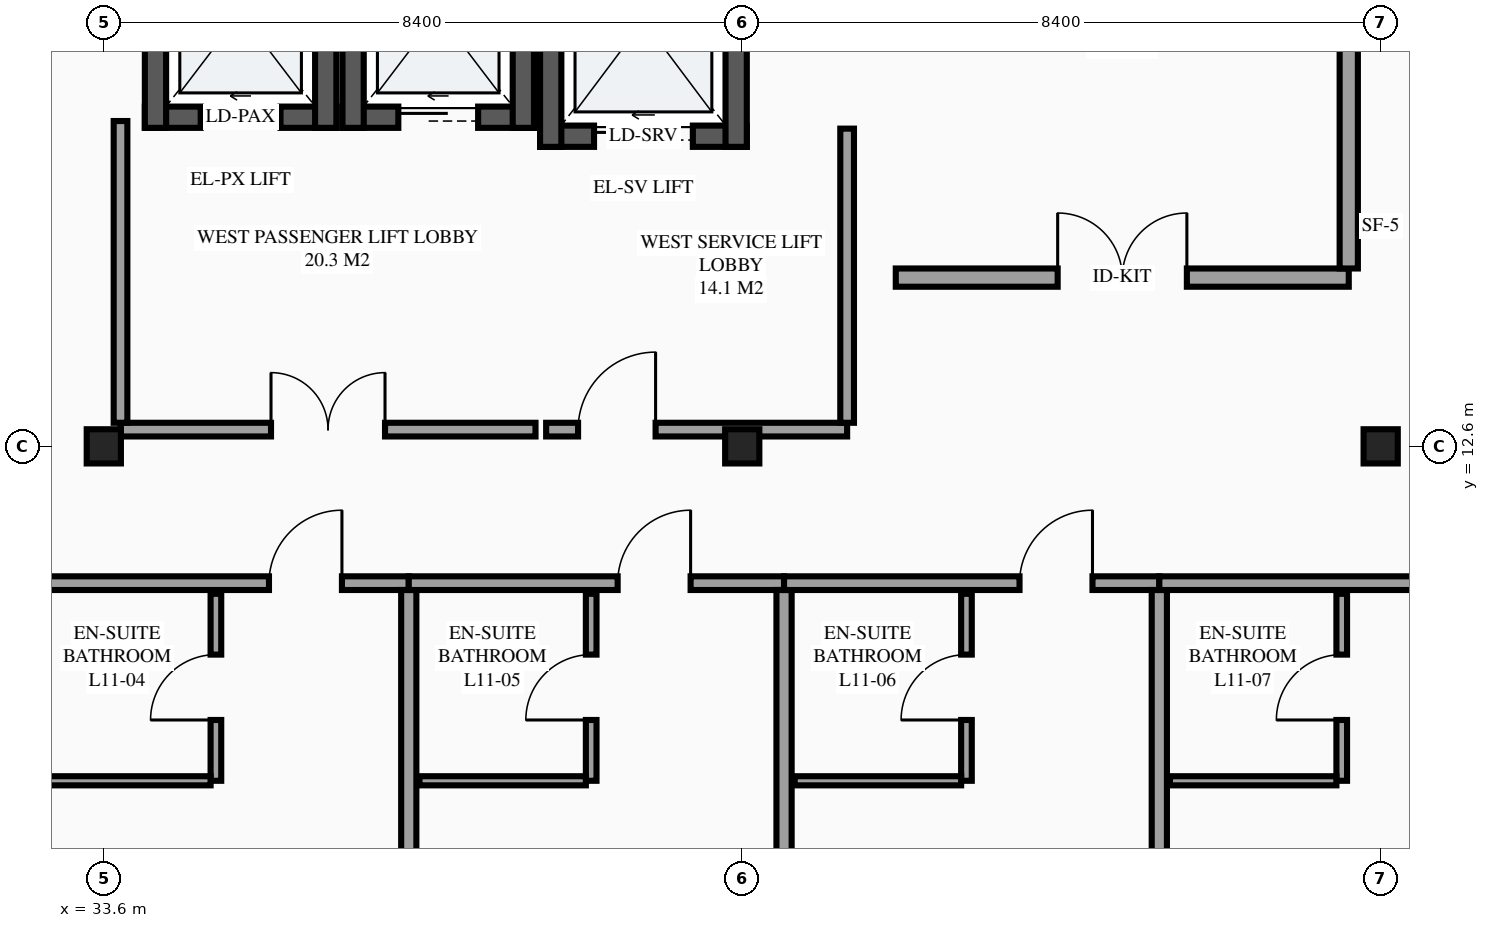
"""IFC4 building model, lengths in metres.
Left out: names, types, materials, properties, quantities, classifications, styles, units other than length and angle.
Written with IfcOpenShell. Run it as: python <this file> out.ifc"""

import sys

from ifc_helpers import new_model, si_unit, direction, frame, frame_2d, origin, origin_2d, place, context, subcontext, project, spatial, rectangle, extrude, element, fill, save


model = new_model("IFC4")
c1 = context("Model", 3, precision=1e-05, world=origin(), true_north=direction((0.0, 1.0)))
c2 = subcontext(c1, "Body", "Model", "MODEL_VIEW")
j1 = project(units=[si_unit("LENGTHUNIT", "METRE"), si_unit("PLANEANGLEUNIT", "RADIAN")], contexts=[c1])
p1 = place(None, origin())
s1 = spatial("IfcSite", under=j1, at=p1, CompositionType="ELEMENT")
p2 = place(p1, origin())
s2 = spatial("IfcBuilding", under=s1, at=p2, CompositionType="ELEMENT")
p3 = place(p2, frame((0.0, 0.0, 43.5)))
s3 = spatial("IfcBuildingStorey", under=s2, at=p3, CompositionType="ELEMENT", Elevation=43.5)
for number, where, z_axis, x_axis in (
    (1, (33.6, 12.6, 0.0), (0.0, 0.0, 1.0), (1.0, 0.0, 0.0)),
    (2, (42.0, 12.6, 0.0), (0.0, 0.0, 1.0), (1.0, 0.0, 0.0)),
    (3, (50.4, 12.6, 0.0), (0.0, 0.0, 1.0), (1.0, 0.0, 0.0)),
):
    element("IfcColumn", number, at=place(p3, frame(where, z_axis=z_axis, x_axis=x_axis)), inside=s3, PredefinedType="COLUMN", context=c2, shape_type="SweptSolid", body=[
        extrude(rectangle(XDim=0.45, YDim=0.45, at=origin_2d()), origin(), (0.0, 0.0, 1.0), 3.6),
    ])
p4 = place(p3, frame((34.14, 16.93, 0.0), z_axis=(0.0, 0.0, 1.0), x_axis=(1.0, 0.0, 0.0)))
e4 = element("IfcWall", 4, at=p4, inside=s3, PredefinedType="SHEAR", context=c2, shape_type="SweptSolid", body=[
    extrude(rectangle(XDim=2.52, YDim=0.28, at=frame_2d((1.26, 0.0))), origin(), (0.0, 0.0, 1.0), 3.6),
])
p5 = place(p4, frame((0.735, 0.0, 0.0)))
e5 = element("IfcOpeningElement", 5, at=p5, cuts=e4, PredefinedType="OPENING", context=c2, shape_type="SweptSolid", body=[
    extrude(rectangle(XDim=1.05, YDim=2.2, at=frame_2d((0.525, 1.1))), frame((0.0, 0.15, 0.0), z_axis=(0.0, -1.0, 0.0), x_axis=(1.0, 0.0, 0.0)), (0.0, 0.0, 1.0), 0.3),
])
for number, where, z_axis, x_axis in (
    (6, (36.52, 16.79, 0.0), (0.0, 0.0, 1.0), (0.0, 1.0, 0.0)),
    (7, (34.28, 19.81, 0.0), (0.0, 0.0, 1.0), (0.0, -1.0, 0.0)),
):
    element("IfcWall", number, at=place(p3, frame(where, z_axis=z_axis, x_axis=x_axis)), inside=s3, PredefinedType="SHEAR", context=c2, shape_type="SweptSolid", body=[
        extrude(rectangle(XDim=3.02, YDim=0.28, at=frame_2d((1.51, 0.0))), origin(), (0.0, 0.0, 1.0), 3.6),
    ])
p6 = place(p3, frame((36.74, 16.93, 0.0), z_axis=(0.0, 0.0, 1.0), x_axis=(1.0, 0.0, 0.0)))
e8 = element("IfcWall", 8, at=p6, inside=s3, PredefinedType="SHEAR", context=c2, shape_type="SweptSolid", body=[
    extrude(rectangle(XDim=2.52, YDim=0.28, at=frame_2d((1.26, 0.0))), origin(), (0.0, 0.0, 1.0), 3.6),
])
p7 = place(p6, frame((0.735, 0.0, 0.0)))
e9 = element("IfcOpeningElement", 9, at=p7, cuts=e8, PredefinedType="OPENING", context=c2, shape_type="SweptSolid", body=[
    extrude(rectangle(XDim=1.05, YDim=2.2, at=frame_2d((0.525, 1.1))), frame((0.0, 0.15, 0.0), z_axis=(0.0, -1.0, 0.0), x_axis=(1.0, 0.0, 0.0)), (0.0, 0.0, 1.0), 0.3),
])
for number, where, z_axis, x_axis in (
    (10, (39.12, 16.79, 0.0), (0.0, 0.0, 1.0), (0.0, 1.0, 0.0)),
    (11, (36.88, 19.81, 0.0), (0.0, 0.0, 1.0), (0.0, -1.0, 0.0)),
):
    element("IfcWall", number, at=place(p3, frame(where, z_axis=z_axis, x_axis=x_axis)), inside=s3, PredefinedType="SHEAR", context=c2, shape_type="SweptSolid", body=[
        extrude(rectangle(XDim=3.02, YDim=0.28, at=frame_2d((1.51, 0.0))), origin(), (0.0, 0.0, 1.0), 3.6),
    ])
p8 = place(p3, frame((39.34, 16.68, 0.0), z_axis=(0.0, 0.0, 1.0), x_axis=(1.0, 0.0, 0.0)))
e12 = element("IfcWall", 12, at=p8, inside=s3, PredefinedType="SHEAR", context=c2, shape_type="SweptSolid", body=[
    extrude(rectangle(XDim=2.72, YDim=0.28, at=frame_2d((1.36, 0.0))), origin(), (0.0, 0.0, 1.0), 3.6),
])
p9 = place(p8, frame((0.71, 0.0, 0.0)))
e13 = element("IfcOpeningElement", 13, at=p9, cuts=e12, PredefinedType="OPENING", context=c2, shape_type="SweptSolid", body=[
    extrude(rectangle(XDim=1.3, YDim=2.25, at=frame_2d((0.65, 1.125))), frame((0.0, 0.15, 0.0), z_axis=(0.0, -1.0, 0.0), x_axis=(1.0, 0.0, 0.0)), (0.0, 0.0, 1.0), 0.3),
])
for number, where, z_axis, x_axis in (
    (14, (41.92, 16.54, 0.0), (0.0, 0.0, 1.0), (0.0, 1.0, 0.0)),
    (15, (39.48, 19.86, 0.0), (0.0, 0.0, 1.0), (0.0, -1.0, 0.0)),
):
    element("IfcWall", number, at=place(p3, frame(where, z_axis=z_axis, x_axis=x_axis)), inside=s3, PredefinedType="SHEAR", context=c2, shape_type="SweptSolid", body=[
        extrude(rectangle(XDim=3.32, YDim=0.28, at=frame_2d((1.66, 0.0))), origin(), (0.0, 0.0, 1.0), 3.6),
    ])
p10 = place(p3, frame((32.675, 10.8, 0.0), z_axis=(0.0, 0.0, 1.0), x_axis=(1.0, 0.0, 0.0)))
e16 = element("IfcWall", 16, at=p10, inside=s3, PredefinedType="PARTITIONING", context=c2, shape_type="SweptSolid", body=[
    extrude(rectangle(XDim=4.938, YDim=0.18, at=frame_2d((2.469, 0.0))), origin(), (0.0, 0.0, 1.0), 3.355),
])
p11 = place(p10, frame((3.098, 0.0, 0.0)))
e17 = element("IfcOpeningElement", 17, at=p11, cuts=e16, PredefinedType="OPENING", context=c2, shape_type="SweptSolid", body=[
    extrude(rectangle(XDim=0.96, YDim=2.15, at=frame_2d((0.48, 1.075))), frame((0.0, 0.1, 0.0), z_axis=(0.0, -1.0, 0.0), x_axis=(1.0, 0.0, 0.0)), (0.0, 0.0, 1.0), 0.2),
])
p12 = place(p3, frame((37.613, 4.36, 0.0), z_axis=(0.0, 0.0, 1.0), x_axis=(0.0, 1.0, 0.0)))
e18 = element("IfcWall", 18, at=p12, inside=s3, PredefinedType="PARTITIONING", context=c2, shape_type="SweptSolid", body=[
    extrude(rectangle(XDim=6.35, YDim=0.2, at=frame_2d((3.175, 0.0))), origin(), (0.0, 0.0, 1.0), 3.355),
])
p13 = place(p3, frame((35.075, 8.2, 0.0), z_axis=(0.0, 0.0, 1.0), x_axis=(0.0, 1.0, 0.0)))
e19 = element("IfcWall", 19, at=p13, inside=s3, PredefinedType="PARTITIONING", context=c2, shape_type="SweptSolid", body=[
    extrude(rectangle(XDim=2.46, YDim=0.14, at=frame_2d((1.23, 0.0))), origin(), (0.0, 0.0, 1.0), 3.355),
])
p14 = place(p13, frame((0.8, 0.0, 0.0)))
e20 = element("IfcOpeningElement", 20, at=p14, cuts=e19, PredefinedType="OPENING", context=c2, shape_type="SweptSolid", body=[
    extrude(rectangle(XDim=0.86, YDim=2.1, at=frame_2d((0.43, 1.05))), frame((0.0, 0.08, 0.0), z_axis=(0.0, -1.0, 0.0), x_axis=(1.0, 0.0, 0.0)), (0.0, 0.0, 1.0), 0.16),
])
p15 = place(p3, frame((32.815, 8.2, 0.0), z_axis=(0.0, 0.0, 1.0), x_axis=(1.0, 0.0, 0.0)))
e21 = element("IfcWall", 21, at=p15, inside=s3, PredefinedType="PARTITIONING", context=c2, shape_type="SweptSolid", body=[
    extrude(rectangle(XDim=2.19, YDim=0.12, at=frame_2d((1.095, 0.0))), origin(), (0.0, 0.0, 1.0), 3.355),
])
p16 = place(p3, frame((37.613, 10.8, 0.0), z_axis=(0.0, 0.0, 1.0), x_axis=(1.0, 0.0, 0.0)))
e22 = element("IfcWall", 22, at=p16, inside=s3, PredefinedType="PARTITIONING", context=c2, shape_type="SweptSolid", body=[
    extrude(rectangle(XDim=4.938, YDim=0.18, at=frame_2d((2.469, 0.0))), origin(), (0.0, 0.0, 1.0), 3.355),
])
p17 = place(p16, frame((2.748, 0.0, 0.0)))
e23 = element("IfcOpeningElement", 23, at=p17, cuts=e22, PredefinedType="OPENING", context=c2, shape_type="SweptSolid", body=[
    extrude(rectangle(XDim=0.96, YDim=2.15, at=frame_2d((0.48, 1.075))), frame((0.0, 0.1, 0.0), z_axis=(0.0, -1.0, 0.0), x_axis=(1.0, 0.0, 0.0)), (0.0, 0.0, 1.0), 0.2),
])
p18 = place(p3, frame((42.55, 4.36, 0.0), z_axis=(0.0, 0.0, 1.0), x_axis=(0.0, 1.0, 0.0)))
e24 = element("IfcWall", 24, at=p18, inside=s3, PredefinedType="PARTITIONING", context=c2, shape_type="SweptSolid", body=[
    extrude(rectangle(XDim=6.35, YDim=0.2, at=frame_2d((3.175, 0.0))), origin(), (0.0, 0.0, 1.0), 3.355),
])
p19 = place(p3, frame((40.012, 8.2, 0.0), z_axis=(0.0, 0.0, 1.0), x_axis=(0.0, 1.0, 0.0)))
e25 = element("IfcWall", 25, at=p19, inside=s3, PredefinedType="PARTITIONING", context=c2, shape_type="SweptSolid", body=[
    extrude(rectangle(XDim=2.46, YDim=0.14, at=frame_2d((1.23, 0.0))), origin(), (0.0, 0.0, 1.0), 3.355),
])
p20 = place(p19, frame((0.8, 0.0, 0.0)))
e26 = element("IfcOpeningElement", 26, at=p20, cuts=e25, PredefinedType="OPENING", context=c2, shape_type="SweptSolid", body=[
    extrude(rectangle(XDim=0.86, YDim=2.1, at=frame_2d((0.43, 1.05))), frame((0.0, 0.08, 0.0), z_axis=(0.0, -1.0, 0.0), x_axis=(1.0, 0.0, 0.0)), (0.0, 0.0, 1.0), 0.16),
])
p21 = place(p3, frame((37.752, 8.2, 0.0), z_axis=(0.0, 0.0, 1.0), x_axis=(1.0, 0.0, 0.0)))
e27 = element("IfcWall", 27, at=p21, inside=s3, PredefinedType="PARTITIONING", context=c2, shape_type="SweptSolid", body=[
    extrude(rectangle(XDim=2.19, YDim=0.12, at=frame_2d((1.095, 0.0))), origin(), (0.0, 0.0, 1.0), 3.355),
])
p22 = place(p3, frame((42.55, 10.8, 0.0), z_axis=(0.0, 0.0, 1.0), x_axis=(1.0, 0.0, 0.0)))
e28 = element("IfcWall", 28, at=p22, inside=s3, PredefinedType="PARTITIONING", context=c2, shape_type="SweptSolid", body=[
    extrude(rectangle(XDim=4.938, YDim=0.18, at=frame_2d((2.469, 0.0))), origin(), (0.0, 0.0, 1.0), 3.355),
])
p23 = place(p22, frame((3.098, 0.0, 0.0)))
e29 = element("IfcOpeningElement", 29, at=p23, cuts=e28, PredefinedType="OPENING", context=c2, shape_type="SweptSolid", body=[
    extrude(rectangle(XDim=0.96, YDim=2.15, at=frame_2d((0.48, 1.075))), frame((0.0, 0.1, 0.0), z_axis=(0.0, -1.0, 0.0), x_axis=(1.0, 0.0, 0.0)), (0.0, 0.0, 1.0), 0.2),
])
p24 = place(p3, frame((47.488, 4.36, 0.0), z_axis=(0.0, 0.0, 1.0), x_axis=(0.0, 1.0, 0.0)))
e30 = element("IfcWall", 30, at=p24, inside=s3, PredefinedType="PARTITIONING", context=c2, shape_type="SweptSolid", body=[
    extrude(rectangle(XDim=6.35, YDim=0.2, at=frame_2d((3.175, 0.0))), origin(), (0.0, 0.0, 1.0), 3.355),
])
p25 = place(p3, frame((44.95, 8.2, 0.0), z_axis=(0.0, 0.0, 1.0), x_axis=(0.0, 1.0, 0.0)))
e31 = element("IfcWall", 31, at=p25, inside=s3, PredefinedType="PARTITIONING", context=c2, shape_type="SweptSolid", body=[
    extrude(rectangle(XDim=2.46, YDim=0.14, at=frame_2d((1.23, 0.0))), origin(), (0.0, 0.0, 1.0), 3.355),
])
p26 = place(p25, frame((0.8, 0.0, 0.0)))
e32 = element("IfcOpeningElement", 32, at=p26, cuts=e31, PredefinedType="OPENING", context=c2, shape_type="SweptSolid", body=[
    extrude(rectangle(XDim=0.86, YDim=2.1, at=frame_2d((0.43, 1.05))), frame((0.0, 0.08, 0.0), z_axis=(0.0, -1.0, 0.0), x_axis=(1.0, 0.0, 0.0)), (0.0, 0.0, 1.0), 0.16),
])
p27 = place(p3, frame((42.69, 8.2, 0.0), z_axis=(0.0, 0.0, 1.0), x_axis=(1.0, 0.0, 0.0)))
e33 = element("IfcWall", 33, at=p27, inside=s3, PredefinedType="PARTITIONING", context=c2, shape_type="SweptSolid", body=[
    extrude(rectangle(XDim=2.19, YDim=0.12, at=frame_2d((1.095, 0.0))), origin(), (0.0, 0.0, 1.0), 3.355),
])
p28 = place(p3, frame((47.488, 10.8, 0.0), z_axis=(0.0, 0.0, 1.0), x_axis=(1.0, 0.0, 0.0)))
e34 = element("IfcWall", 34, at=p28, inside=s3, PredefinedType="PARTITIONING", context=c2, shape_type="SweptSolid", body=[
    extrude(rectangle(XDim=4.938, YDim=0.18, at=frame_2d((2.469, 0.0))), origin(), (0.0, 0.0, 1.0), 3.355),
])
p29 = place(p28, frame((3.448, 0.0, 0.0)))
e35 = element("IfcOpeningElement", 35, at=p29, cuts=e34, PredefinedType="OPENING", context=c2, shape_type="SweptSolid", body=[
    extrude(rectangle(XDim=0.96, YDim=2.15, at=frame_2d((0.48, 1.075))), frame((0.0, 0.1, 0.0), z_axis=(0.0, -1.0, 0.0), x_axis=(1.0, 0.0, 0.0)), (0.0, 0.0, 1.0), 0.2),
])
p30 = place(p3, frame((49.887, 8.2, 0.0), z_axis=(0.0, 0.0, 1.0), x_axis=(0.0, 1.0, 0.0)))
e36 = element("IfcWall", 36, at=p30, inside=s3, PredefinedType="PARTITIONING", context=c2, shape_type="SweptSolid", body=[
    extrude(rectangle(XDim=2.46, YDim=0.14, at=frame_2d((1.23, 0.0))), origin(), (0.0, 0.0, 1.0), 3.355),
])
p31 = place(p30, frame((0.8, 0.0, 0.0)))
e37 = element("IfcOpeningElement", 37, at=p31, cuts=e36, PredefinedType="OPENING", context=c2, shape_type="SweptSolid", body=[
    extrude(rectangle(XDim=0.86, YDim=2.1, at=frame_2d((0.43, 1.05))), frame((0.0, 0.08, 0.0), z_axis=(0.0, -1.0, 0.0), x_axis=(1.0, 0.0, 0.0)), (0.0, 0.0, 1.0), 0.16),
])
p32 = place(p3, frame((47.627, 8.2, 0.0), z_axis=(0.0, 0.0, 1.0), x_axis=(1.0, 0.0, 0.0)))
e38 = element("IfcWall", 38, at=p32, inside=s3, PredefinedType="PARTITIONING", context=c2, shape_type="SweptSolid", body=[
    extrude(rectangle(XDim=2.19, YDim=0.12, at=frame_2d((1.095, 0.0))), origin(), (0.0, 0.0, 1.0), 3.355),
])
p33 = place(p3, frame((33.82, 12.82, 0.0), z_axis=(0.0, 0.0, 1.0), x_axis=(1.0, 0.0, 0.0)))
e39 = element("IfcWall", 39, at=p33, inside=s3, PredefinedType="PARTITIONING", context=c2, shape_type="SweptSolid", body=[
    extrude(rectangle(XDim=5.46, YDim=0.18, at=frame_2d((2.73, 0.0))), origin(), (0.0, 0.0, 1.0), 2.56),
])
p34 = place(p33, frame((1.98, 0.0, 0.0)))
e40 = element("IfcOpeningElement", 40, at=p34, cuts=e39, PredefinedType="OPENING", context=c2, shape_type="SweptSolid", body=[
    extrude(rectangle(XDim=1.5, YDim=2.15, at=frame_2d((0.75, 1.075))), frame((0.0, 0.1, 0.0), z_axis=(0.0, -1.0, 0.0), x_axis=(1.0, 0.0, 0.0)), (0.0, 0.0, 1.0), 0.2),
])
p35 = place(p3, frame((33.82, 12.91, 0.0), z_axis=(0.0, 0.0, 1.0), x_axis=(0.0, 1.0, 0.0)))
e41 = element("IfcWall", 41, at=p35, inside=s3, PredefinedType="PARTITIONING", context=c2, shape_type="SweptSolid", body=[
    extrude(rectangle(XDim=3.97, YDim=0.18, at=frame_2d((1.985, 0.0))), origin(), (0.0, 0.0, 1.0), 3.355),
])
p36 = place(p3, frame((39.42, 12.82, 0.0), z_axis=(0.0, 0.0, 1.0), x_axis=(1.0, 0.0, 0.0)))
e42 = element("IfcWall", 42, at=p36, inside=s3, PredefinedType="PARTITIONING", context=c2, shape_type="SweptSolid", body=[
    extrude(rectangle(XDim=3.96, YDim=0.18, at=frame_2d((1.98, 0.0))), origin(), (0.0, 0.0, 1.0), 2.51),
])
p37 = place(p36, frame((0.42, 0.0, 0.0)))
e43 = element("IfcOpeningElement", 43, at=p37, cuts=e42, PredefinedType="OPENING", context=c2, shape_type="SweptSolid", body=[
    extrude(rectangle(XDim=1.02, YDim=2.15, at=frame_2d((0.51, 1.075))), frame((0.0, 0.1, 0.0), z_axis=(0.0, -1.0, 0.0), x_axis=(1.0, 0.0, 0.0)), (0.0, 0.0, 1.0), 0.2),
])
p38 = place(p3, frame((43.38, 12.91, 0.0), z_axis=(0.0, 0.0, 1.0), x_axis=(0.0, 1.0, 0.0)))
e44 = element("IfcWall", 44, at=p38, inside=s3, PredefinedType="PARTITIONING", context=c2, shape_type="SweptSolid", body=[
    extrude(rectangle(XDim=3.87, YDim=0.18, at=frame_2d((1.935, 0.0))), origin(), (0.0, 0.0, 1.0), 3.355),
])
p39 = place(p3, frame((44.02, 14.82, 0.0), z_axis=(0.0, 0.0, 1.0), x_axis=(1.0, 0.0, 0.0)))
e45 = element("IfcWall", 45, at=p39, inside=s3, PredefinedType="PARTITIONING", context=c2, shape_type="SweptSolid", body=[
    extrude(rectangle(XDim=5.96, YDim=0.24, at=frame_2d((2.98, 0.0))), origin(), (0.0, 0.0, 1.0), 3.355),
])
p40 = place(p39, frame((2.13, 0.0, 0.0)))
e46 = element("IfcOpeningElement", 46, at=p40, cuts=e45, PredefinedType="OPENING", context=c2, shape_type="SweptSolid", body=[
    extrude(rectangle(XDim=1.7, YDim=2.2, at=frame_2d((0.85, 1.1))), frame((0.0, 0.13, 0.0), z_axis=(0.0, -1.0, 0.0), x_axis=(1.0, 0.0, 0.0)), (0.0, 0.0, 1.0), 0.26),
])
p41 = place(p3, frame((49.98, 14.94, 0.0), z_axis=(0.0, 0.0, 1.0), x_axis=(0.0, 1.0, 0.0)))
e47 = element("IfcWall", 47, at=p41, inside=s3, PredefinedType="PARTITIONING", context=c2, shape_type="SweptSolid", body=[
    extrude(rectangle(XDim=5.44, YDim=0.24, at=frame_2d((2.72, 0.0))), origin(), (0.0, 0.0, 1.0), 3.355),
])
p42 = place(p5, origin())
e48 = element("IfcDoor", 48, at=p42, inside=s3, OperationType="SLIDING_TO_LEFT", PredefinedType="DOOR", context=c2, shape_type="SweptSolid", body=[
    extrude(rectangle(XDim=1.05, YDim=2.2, at=frame_2d((0.525, 1.1))), frame((0.0, 0.025, 0.0), z_axis=(0.0, -1.0, 0.0), x_axis=(1.0, 0.0, 0.0)), (0.0, 0.0, 1.0), 0.05),
])
fill(e5, e48)
p43 = place(p7, origin())
e49 = element("IfcDoor", 49, at=p43, inside=s3, OperationType="SLIDING_TO_LEFT", PredefinedType="DOOR", context=c2, shape_type="SweptSolid", body=[
    extrude(rectangle(XDim=1.05, YDim=2.2, at=frame_2d((0.525, 1.1))), frame((0.0, 0.025, 0.0), z_axis=(0.0, -1.0, 0.0), x_axis=(1.0, 0.0, 0.0)), (0.0, 0.0, 1.0), 0.05),
])
fill(e9, e49)
p44 = place(p9, origin())
e50 = element("IfcDoor", 50, at=p44, inside=s3, OperationType="SLIDING_TO_LEFT", PredefinedType="DOOR", context=c2, shape_type="SweptSolid", body=[
    extrude(rectangle(XDim=1.3, YDim=2.25, at=frame_2d((0.65, 1.125))), frame((0.0, 0.025, 0.0), z_axis=(0.0, -1.0, 0.0), x_axis=(1.0, 0.0, 0.0)), (0.0, 0.0, 1.0), 0.05),
])
fill(e13, e50)
p45 = place(p11, origin())
e51 = element("IfcDoor", 51, at=p45, inside=s3, OperationType="SINGLE_SWING_RIGHT", PredefinedType="DOOR", context=c2, shape_type="SweptSolid", body=[
    extrude(rectangle(XDim=0.96, YDim=2.15, at=frame_2d((0.48, 1.075))), frame((0.0, 0.025, 0.0), z_axis=(0.0, -1.0, 0.0), x_axis=(1.0, 0.0, 0.0)), (0.0, 0.0, 1.0), 0.05),
])
fill(e17, e51)
p46 = place(p14, origin())
e52 = element("IfcDoor", 52, at=p46, inside=s3, OperationType="SINGLE_SWING_LEFT", PredefinedType="DOOR", context=c2, shape_type="SweptSolid", body=[
    extrude(rectangle(XDim=0.86, YDim=2.1, at=frame_2d((0.43, 1.05))), frame((0.0, 0.025, 0.0), z_axis=(0.0, -1.0, 0.0), x_axis=(1.0, 0.0, 0.0)), (0.0, 0.0, 1.0), 0.05),
])
fill(e20, e52)
p47 = place(p17, origin())
e53 = element("IfcDoor", 53, at=p47, inside=s3, OperationType="SINGLE_SWING_RIGHT", PredefinedType="DOOR", context=c2, shape_type="SweptSolid", body=[
    extrude(rectangle(XDim=0.96, YDim=2.15, at=frame_2d((0.48, 1.075))), frame((0.0, 0.025, 0.0), z_axis=(0.0, -1.0, 0.0), x_axis=(1.0, 0.0, 0.0)), (0.0, 0.0, 1.0), 0.05),
])
fill(e23, e53)
p48 = place(p20, origin())
e54 = element("IfcDoor", 54, at=p48, inside=s3, OperationType="SINGLE_SWING_LEFT", PredefinedType="DOOR", context=c2, shape_type="SweptSolid", body=[
    extrude(rectangle(XDim=0.86, YDim=2.1, at=frame_2d((0.43, 1.05))), frame((0.0, 0.025, 0.0), z_axis=(0.0, -1.0, 0.0), x_axis=(1.0, 0.0, 0.0)), (0.0, 0.0, 1.0), 0.05),
])
fill(e26, e54)
p49 = place(p23, origin())
e55 = element("IfcDoor", 55, at=p49, inside=s3, OperationType="SINGLE_SWING_RIGHT", PredefinedType="DOOR", context=c2, shape_type="SweptSolid", body=[
    extrude(rectangle(XDim=0.96, YDim=2.15, at=frame_2d((0.48, 1.075))), frame((0.0, 0.025, 0.0), z_axis=(0.0, -1.0, 0.0), x_axis=(1.0, 0.0, 0.0)), (0.0, 0.0, 1.0), 0.05),
])
fill(e29, e55)
p50 = place(p26, origin())
e56 = element("IfcDoor", 56, at=p50, inside=s3, OperationType="SINGLE_SWING_LEFT", PredefinedType="DOOR", context=c2, shape_type="SweptSolid", body=[
    extrude(rectangle(XDim=0.86, YDim=2.1, at=frame_2d((0.43, 1.05))), frame((0.0, 0.025, 0.0), z_axis=(0.0, -1.0, 0.0), x_axis=(1.0, 0.0, 0.0)), (0.0, 0.0, 1.0), 0.05),
])
fill(e32, e56)
p51 = place(p31, origin())
e57 = element("IfcDoor", 57, at=p51, inside=s3, OperationType="SINGLE_SWING_LEFT", PredefinedType="DOOR", context=c2, shape_type="SweptSolid", body=[
    extrude(rectangle(XDim=0.86, YDim=2.1, at=frame_2d((0.43, 1.05))), frame((0.0, 0.025, 0.0), z_axis=(0.0, -1.0, 0.0), x_axis=(1.0, 0.0, 0.0)), (0.0, 0.0, 1.0), 0.05),
])
fill(e37, e57)
p52 = place(p34, origin())
e58 = element("IfcDoor", 58, at=p52, inside=s3, OperationType="DOUBLE_DOOR_SINGLE_SWING", PredefinedType="DOOR", context=c2, shape_type="SweptSolid", body=[
    extrude(rectangle(XDim=1.5, YDim=2.15, at=frame_2d((0.75, 1.075))), frame((0.0, 0.025, 0.0), z_axis=(0.0, -1.0, 0.0), x_axis=(1.0, 0.0, 0.0)), (0.0, 0.0, 1.0), 0.05),
])
fill(e40, e58)
p53 = place(p37, origin())
e59 = element("IfcDoor", 59, at=p53, inside=s3, OperationType="SINGLE_SWING_RIGHT", PredefinedType="DOOR", context=c2, shape_type="SweptSolid", body=[
    extrude(rectangle(XDim=1.02, YDim=2.15, at=frame_2d((0.51, 1.075))), frame((0.0, 0.025, 0.0), z_axis=(0.0, -1.0, 0.0), x_axis=(1.0, 0.0, 0.0)), (0.0, 0.0, 1.0), 0.05),
])
fill(e43, e59)
p54 = place(p40, origin())
e60 = element("IfcDoor", 60, at=p54, inside=s3, OperationType="DOUBLE_DOOR_SINGLE_SWING", PredefinedType="DOOR", context=c2, shape_type="SweptSolid", body=[
    extrude(rectangle(XDim=1.7, YDim=2.2, at=frame_2d((0.85, 1.1))), frame((0.0, 0.025, 0.0), z_axis=(0.0, -1.0, 0.0), x_axis=(1.0, 0.0, 0.0)), (0.0, 0.0, 1.0), 0.05),
])
fill(e46, e60)
save(model, sys.argv[1])
